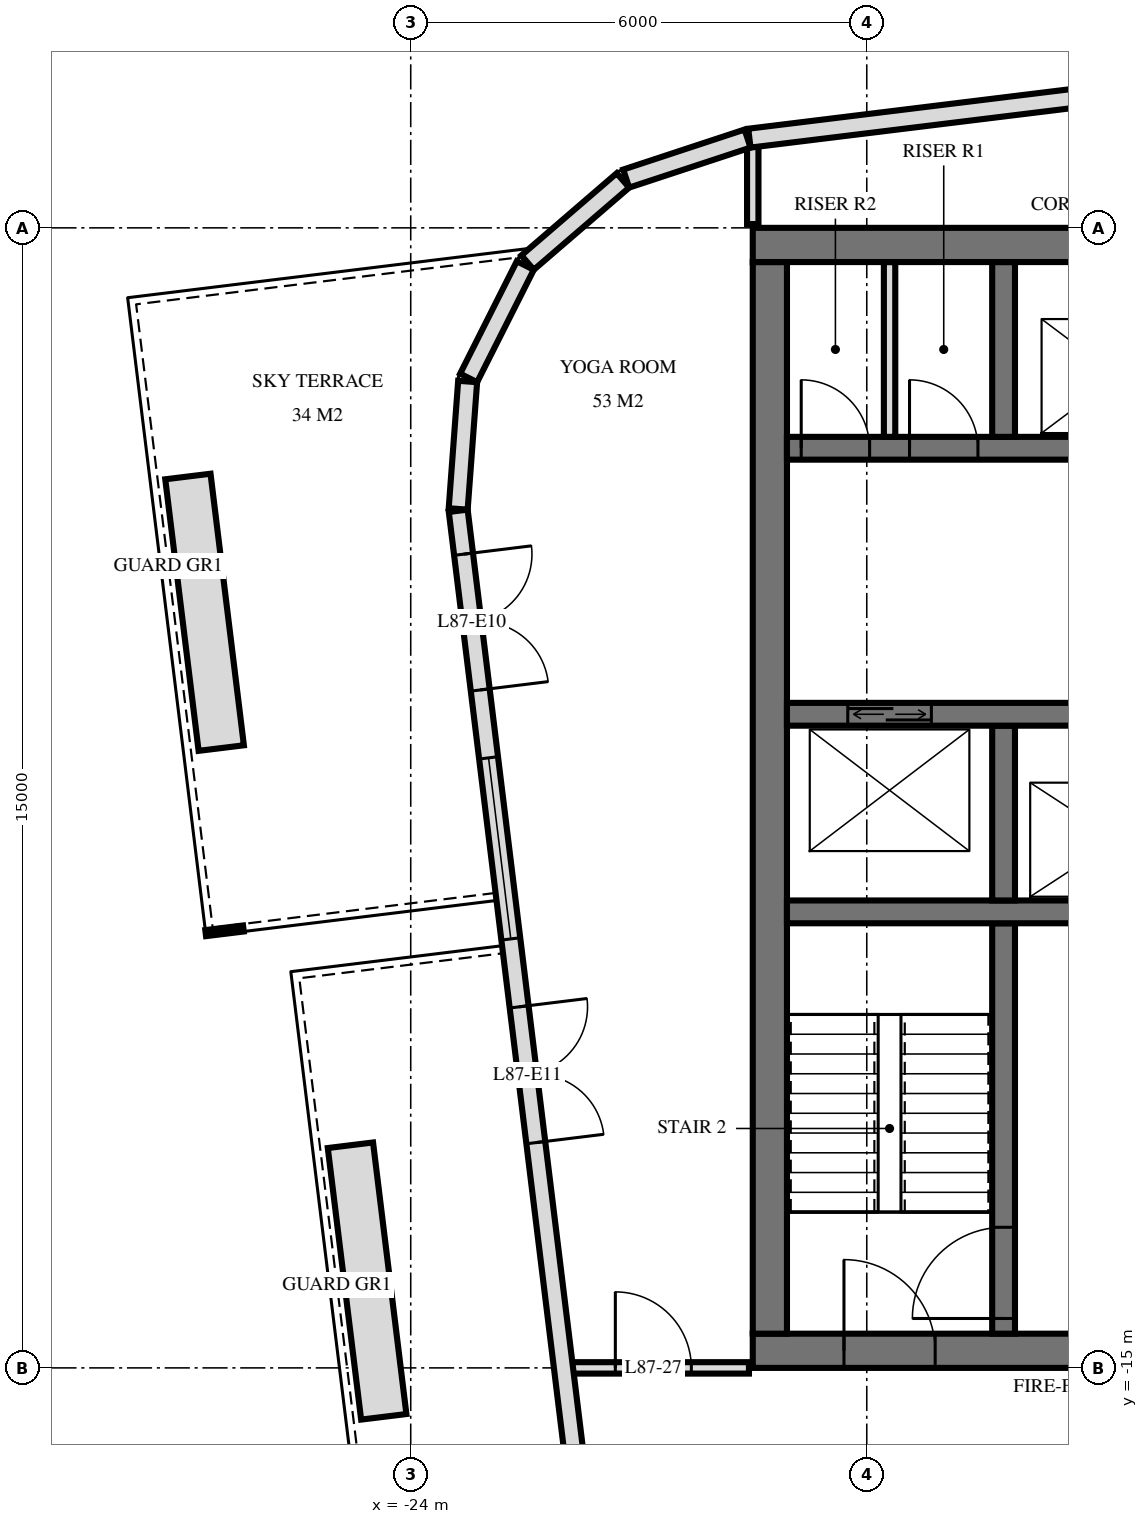
"""IFC4 building model, lengths in metres.
Left out: names, types, materials, properties, quantities, classifications, styles, units other than length and angle.
Written with IfcOpenShell. Run it as: python <this file> out.ifc"""

import sys

from ifc_helpers import new_model, si_unit, direction, frame, frame_2d, origin, place, context, subcontext, project, spatial, rectangle, extrude, element, fill, save


model = new_model("IFC4")
c1 = context("Model", 3, precision=1e-05, world=origin(), true_north=direction((0.0, 1.0)))
c2 = subcontext(c1, "Body", "Model", "MODEL_VIEW")
j1 = project(units=[si_unit("LENGTHUNIT", "METRE"), si_unit("PLANEANGLEUNIT", "RADIAN")], contexts=[c1])
p1 = place(None, origin())
s1 = spatial("IfcSite", under=j1, at=p1, CompositionType="ELEMENT")
p2 = place(p1, origin())
s2 = spatial("IfcBuilding", under=s1, at=p2, CompositionType="ELEMENT")
p3 = place(p2, frame((0.0, 0.0, 330.6)))
s3 = spatial("IfcBuildingStorey", under=s2, at=p3, CompositionType="ELEMENT", Elevation=330.6)
p4 = place(p3, frame((-19.5, -0.225, 0.0), z_axis=(0.0, 0.0, 1.0), x_axis=(1.0, 0.0, 0.0)))
e1 = element("IfcWall", 1, at=p4, inside=s3, PredefinedType="SHEAR", context=c2, shape_type="SweptSolid", body=[
    extrude(rectangle(XDim=9.5, YDim=0.45, at=frame_2d((4.75, 0.0))), origin(), (0.0, 0.0, 1.0), 4.0),
])
p5 = place(p3, frame((-19.5, -14.775, 0.0), z_axis=(0.0, 0.0, 1.0), x_axis=(1.0, 0.0, 0.0)))
e2 = element("IfcWall", 2, at=p5, inside=s3, PredefinedType="SHEAR", context=c2, shape_type="SweptSolid", body=[
    extrude(rectangle(XDim=9.5, YDim=0.45, at=frame_2d((4.75, 0.0))), origin(), (0.0, 0.0, 1.0), 4.0),
])
p6 = place(p5, frame((1.2, 0.0, 0.0)))
e3 = element("IfcOpeningElement", 3, at=p6, cuts=e2, PredefinedType="OPENING", context=c2, shape_type="SweptSolid", body=[
    extrude(rectangle(XDim=1.2, YDim=2.1, at=frame_2d((0.6, 1.05))), frame((0.0, 0.235, 0.0), z_axis=(0.0, -1.0, 0.0), x_axis=(1.0, 0.0, 0.0)), (0.0, 0.0, 1.0), 0.47),
])
p7 = place(p5, frame((4.25, 0.0, 0.0)))
e4 = element("IfcOpeningElement", 4, at=p7, cuts=e2, PredefinedType="OPENING", context=c2, shape_type="SweptSolid", body=[
    extrude(rectangle(XDim=1.1, YDim=2.1, at=frame_2d((0.55, 1.05))), frame((0.0, 0.235, 0.0), z_axis=(0.0, -1.0, 0.0), x_axis=(1.0, 0.0, 0.0)), (0.0, 0.0, 1.0), 0.47),
])
p8 = place(p3, frame((-19.275, -14.55, 0.0), z_axis=(0.0, 0.0, 1.0), x_axis=(0.0, 1.0, 0.0)))
e5 = element("IfcWall", 5, at=p8, inside=s3, PredefinedType="SHEAR", context=c2, shape_type="SweptSolid", body=[
    extrude(rectangle(XDim=14.1, YDim=0.45, at=frame_2d((7.05, 0.0))), origin(), (0.0, 0.0, 1.0), 4.0),
])
p9 = place(p3, frame((-19.05, -2.9, 0.0), z_axis=(0.0, 0.0, 1.0), x_axis=(1.0, 0.0, 0.0)))
e6 = element("IfcWall", 6, at=p9, inside=s3, PredefinedType="SHEAR", context=c2, shape_type="SweptSolid", body=[
    extrude(rectangle(XDim=8.7, YDim=0.3, at=frame_2d((4.35, 0.0))), origin(), (0.0, 0.0, 1.0), 4.0),
])
p10 = place(p9, frame((6.8, 0.0, 0.0)))
e7 = element("IfcOpeningElement", 7, at=p10, cuts=e6, PredefinedType="OPENING", context=c2, shape_type="SweptSolid", body=[
    extrude(rectangle(XDim=1.1, YDim=2.1, at=frame_2d((0.55, 1.05))), frame((0.0, 0.16, 0.0), z_axis=(0.0, -1.0, 0.0), x_axis=(1.0, 0.0, 0.0)), (0.0, 0.0, 1.0), 0.32),
])
p11 = place(p9, frame((3.8, 0.0, 0.0)))
e8 = element("IfcOpeningElement", 8, at=p11, cuts=e6, PredefinedType="OPENING", context=c2, shape_type="SweptSolid", body=[
    extrude(rectangle(XDim=1.1, YDim=2.1, at=frame_2d((0.55, 1.05))), frame((0.0, 0.16, 0.0), z_axis=(0.0, -1.0, 0.0), x_axis=(1.0, 0.0, 0.0)), (0.0, 0.0, 1.0), 0.32),
])
p12 = place(p9, frame((1.613, 0.0, 0.0)))
e9 = element("IfcOpeningElement", 9, at=p12, cuts=e6, PredefinedType="OPENING", context=c2, shape_type="SweptSolid", body=[
    extrude(rectangle(XDim=0.9, YDim=2.1, at=frame_2d((0.45, 1.05))), frame((0.0, 0.16, 0.0), z_axis=(0.0, -1.0, 0.0), x_axis=(1.0, 0.0, 0.0)), (0.0, 0.0, 1.0), 0.32),
])
p13 = place(p9, frame((0.188, 0.0, 0.0)))
e10 = element("IfcOpeningElement", 10, at=p13, cuts=e6, PredefinedType="OPENING", context=c2, shape_type="SweptSolid", body=[
    extrude(rectangle(XDim=0.9, YDim=2.1, at=frame_2d((0.45, 1.05))), frame((0.0, 0.16, 0.0), z_axis=(0.0, -1.0, 0.0), x_axis=(1.0, 0.0, 0.0)), (0.0, 0.0, 1.0), 0.32),
])
p14 = place(p3, frame((-19.05, -6.4, 0.0), z_axis=(0.0, 0.0, 1.0), x_axis=(1.0, 0.0, 0.0)))
e11 = element("IfcWall", 11, at=p14, inside=s3, PredefinedType="SHEAR", context=c2, shape_type="SweptSolid", body=[
    extrude(rectangle(XDim=8.7, YDim=0.3, at=frame_2d((4.35, 0.0))), origin(), (0.0, 0.0, 1.0), 4.0),
])
p15 = place(p14, frame((0.8, 0.0, 0.0)))
e12 = element("IfcOpeningElement", 12, at=p15, cuts=e11, PredefinedType="OPENING", context=c2, shape_type="SweptSolid", body=[
    extrude(rectangle(XDim=1.1, YDim=2.1, at=frame_2d((0.55, 1.05))), frame((0.0, 0.16, 0.0), z_axis=(0.0, -1.0, 0.0), x_axis=(1.0, 0.0, 0.0)), (0.0, 0.0, 1.0), 0.32),
])
p16 = place(p3, frame((-19.05, -9.0, 0.0), z_axis=(0.0, 0.0, 1.0), x_axis=(1.0, 0.0, 0.0)))
e13 = element("IfcWall", 13, at=p16, inside=s3, PredefinedType="SHEAR", context=c2, shape_type="SweptSolid", body=[
    extrude(rectangle(XDim=8.7, YDim=0.3, at=frame_2d((4.35, 0.0))), origin(), (0.0, 0.0, 1.0), 4.0),
])
p17 = place(p16, frame((3.8, 0.0, 0.0)))
e14 = element("IfcOpeningElement", 14, at=p17, cuts=e13, PredefinedType="OPENING", context=c2, shape_type="SweptSolid", body=[
    extrude(rectangle(XDim=1.1, YDim=2.1, at=frame_2d((0.55, 1.05))), frame((0.0, 0.16, 0.0), z_axis=(0.0, -1.0, 0.0), x_axis=(1.0, 0.0, 0.0)), (0.0, 0.0, 1.0), 0.32),
])
for number, where, z_axis, x_axis in (
    (15, (-16.2, -2.75, 0.0), (0.0, 0.0, 1.0), (0.0, 1.0, 0.0)),
    (16, (-16.2, -8.85, 0.0), (0.0, 0.0, 1.0), (0.0, 1.0, 0.0)),
):
    element("IfcWall", number, at=place(p3, frame(where, z_axis=z_axis, x_axis=x_axis)), inside=s3, PredefinedType="SHEAR", context=c2, shape_type="SweptSolid", body=[
        extrude(rectangle(XDim=2.3, YDim=0.3, at=frame_2d((1.15, 0.0))), origin(), (0.0, 0.0, 1.0), 4.0),
    ])
p18 = place(p3, frame((-16.2, -14.55, 0.0), z_axis=(0.0, 0.0, 1.0), x_axis=(0.0, 1.0, 0.0)))
e17 = element("IfcWall", 17, at=p18, inside=s3, PredefinedType="SHEAR", context=c2, shape_type="SweptSolid", body=[
    extrude(rectangle(XDim=5.4, YDim=0.3, at=frame_2d((2.7, 0.0))), origin(), (0.0, 0.0, 1.0), 4.0),
])
p19 = place(p18, frame((0.2, 0.0, 0.0)))
e18 = element("IfcOpeningElement", 18, at=p19, cuts=e17, PredefinedType="OPENING", context=c2, shape_type="SweptSolid", body=[
    extrude(rectangle(XDim=1.2, YDim=2.1, at=frame_2d((0.6, 1.05))), frame((0.0, 0.16, 0.0), z_axis=(0.0, -1.0, 0.0), x_axis=(1.0, 0.0, 0.0)), (0.0, 0.0, 1.0), 0.32),
])
p20 = place(p3, frame((16.138, 5.561, 0.0), z_axis=(0.0, 0.0, 1.0), x_axis=(-0.992546726876, -0.121864658405, 0.0)))
e19 = element("IfcWall", 19, at=p20, inside=s3, PredefinedType="SOLIDWALL", context=c2, shape_type="SweptSolid", body=[
    extrude(rectangle(XDim=35.951, YDim=0.25, at=frame_2d((17.975, 0.0))), origin(), (0.0, 0.0, 1.0), 3.72),
])
p21 = place(p20, frame((12.275, 0.0, 0.0)))
e20 = element("IfcOpeningElement", 20, at=p21, cuts=e19, PredefinedType="OPENING", context=c2, shape_type="SweptSolid", body=[
    extrude(rectangle(XDim=2.4, YDim=2.4, at=frame_2d((1.2, 1.2))), frame((0.0, 0.135, 0.0), z_axis=(0.0, -1.0, 0.0), x_axis=(1.0, 0.0, 0.0)), (0.0, 0.0, 1.0), 0.27),
])
p22 = place(p20, frame((17.865, 0.0, 0.0)))
e21 = element("IfcOpeningElement", 21, at=p22, cuts=e19, PredefinedType="OPENING", context=c2, shape_type="SweptSolid", body=[
    extrude(rectangle(XDim=2.4, YDim=2.4, at=frame_2d((1.2, 1.2))), frame((0.0, 0.135, 0.0), z_axis=(0.0, -1.0, 0.0), x_axis=(1.0, 0.0, 0.0)), (0.0, 0.0, 1.0), 0.27),
])
p23 = place(p20, frame((21.275, 0.0, 0.0)))
e22 = element("IfcOpeningElement", 22, at=p23, cuts=e19, PredefinedType="OPENING", context=c2, shape_type="SweptSolid", body=[
    extrude(rectangle(XDim=2.4, YDim=2.4, at=frame_2d((1.2, 1.2))), frame((0.0, 0.135, 0.0), z_axis=(0.0, -1.0, 0.0), x_axis=(1.0, 0.0, 0.0)), (0.0, 0.0, 1.0), 0.27),
])
p24 = place(p3, frame((-19.568, 1.175, 0.0), z_axis=(0.0, 0.0, 1.0), x_axis=(-0.949694735798, -0.313177120489, 0.0)))
e23 = element("IfcWall", 23, at=p24, inside=s3, PredefinedType="SOLIDWALL", context=c2, shape_type="SweptSolid", body=[
    extrude(rectangle(XDim=1.681, YDim=0.25, at=frame_2d((0.841, 0.0))), origin(), (0.0, 0.0, 1.0), 3.72),
])
p25 = place(p3, frame((-21.208, 0.624, 0.0), z_axis=(0.0, 0.0, 1.0), x_axis=(-0.757568315466, -0.652755886531, 0.0)))
e24 = element("IfcWall", 24, at=p25, inside=s3, PredefinedType="SOLIDWALL", context=c2, shape_type="SweptSolid", body=[
    extrude(rectangle(XDim=1.656, YDim=0.25, at=frame_2d((0.828, 0.0))), origin(), (0.0, 0.0, 1.0), 3.72),
])
p26 = place(p3, frame((-22.493, -0.495, 0.0), z_axis=(0.0, 0.0, 1.0), x_axis=(-0.449982385812, -0.893037430604, 0.0)))
e25 = element("IfcWall", 25, at=p26, inside=s3, PredefinedType="SOLIDWALL", context=c2, shape_type="SweptSolid", body=[
    extrude(rectangle(XDim=1.656, YDim=0.25, at=frame_2d((0.828, 0.0))), origin(), (0.0, 0.0, 1.0), 3.72),
])
p27 = place(p3, frame((-23.251, -2.021, 0.0), z_axis=(0.0, 0.0, 1.0), x_axis=(-0.074053534713, -0.997254267475, 0.0)))
e26 = element("IfcWall", 26, at=p27, inside=s3, PredefinedType="SOLIDWALL", context=c2, shape_type="SweptSolid", body=[
    extrude(rectangle(XDim=1.681, YDim=0.25, at=frame_2d((0.841, 0.0))), origin(), (0.0, 0.0, 1.0), 3.72),
])
p28 = place(p3, frame((-23.375, -3.723, 0.0), z_axis=(0.0, 0.0, 1.0), x_axis=(0.121862878281, -0.992546945437, 0.0)))
e27 = element("IfcWall", 27, at=p28, inside=s3, PredefinedType="SOLIDWALL", context=c2, shape_type="SweptSolid", body=[
    extrude(rectangle(XDim=19.151, YDim=0.25, at=frame_2d((9.575, 0.0))), origin(), (0.0, 0.0, 1.0), 3.72),
])
p29 = place(p28, frame((0.575, 0.0, 0.0)))
e28 = element("IfcOpeningElement", 28, at=p29, cuts=e27, PredefinedType="OPENING", context=c2, shape_type="SweptSolid", body=[
    extrude(rectangle(XDim=1.8, YDim=2.4, at=frame_2d((0.9, 1.2))), frame((0.0, 0.135, 0.0), z_axis=(0.0, -1.0, 0.0), x_axis=(1.0, 0.0, 0.0)), (0.0, 0.0, 1.0), 0.27),
])
p30 = place(p28, frame((3.275, 0.0, 0.0)))
e29 = element("IfcOpeningElement", 29, at=p30, cuts=e27, PredefinedType="OPENING", context=c2, shape_type="SweptSolid", body=[
    extrude(rectangle(XDim=2.4, YDim=2.4, at=frame_2d((1.2, 1.2))), frame((0.0, 0.135, 0.0), z_axis=(0.0, -1.0, 0.0), x_axis=(1.0, 0.0, 0.0)), (0.0, 0.0, 1.0), 0.27),
])
p31 = place(p28, frame((6.576, 0.0, 0.0)))
e30 = element("IfcOpeningElement", 30, at=p31, cuts=e27, PredefinedType="OPENING", context=c2, shape_type="SweptSolid", body=[
    extrude(rectangle(XDim=1.8, YDim=2.4, at=frame_2d((0.9, 1.2))), frame((0.0, 0.135, 0.0), z_axis=(0.0, -1.0, 0.0), x_axis=(1.0, 0.0, 0.0)), (0.0, 0.0, 1.0), 0.27),
])
p32 = place(p28, frame((15.775, 0.0, 0.0)))
e31 = element("IfcOpeningElement", 31, at=p32, cuts=e27, PredefinedType="OPENING", context=c2, shape_type="SweptSolid", body=[
    extrude(rectangle(XDim=1.8, YDim=2.4, at=frame_2d((0.9, 1.2))), frame((0.0, 0.135, 0.0), z_axis=(0.0, -1.0, 0.0), x_axis=(1.0, 0.0, 0.0)), (0.0, 0.0, 1.0), 0.27),
])
for number, where, z_axis, x_axis in (
    (32, (-24.355, -15.644, 0.0), (0.0, 0.0, 1.0), (-0.122, 0.993, 0.0)),
    (33, (-26.493, -6.845, 0.0), (0.0, 0.0, 1.0), (-0.122, 0.993, 0.0)),
):
    element("IfcWall", number, at=place(p3, frame(where, z_axis=z_axis, x_axis=x_axis)), inside=s3, PredefinedType="USERDEFINED", context=c2, shape_type="SweptSolid", body=[
        extrude(rectangle(XDim=3.6, YDim=0.6, at=frame_2d((1.8, 0.0))), origin(), (0.0, 0.0, 1.0), 0.65),
    ])
p33 = place(p3, frame((-17.7, -2.75, 0.0), z_axis=(0.0, 0.0, 1.0), x_axis=(0.0, 1.0, 0.0)))
e34 = element("IfcWall", 34, at=p33, inside=s3, PredefinedType="PARTITIONING", context=c2, shape_type="SweptSolid", body=[
    extrude(rectangle(XDim=2.3, YDim=0.15, at=frame_2d((1.15, 0.0))), origin(), (0.0, 0.0, 1.0), 3.7),
])
p34 = place(p3, frame((-19.5, 0.05, 0.0), z_axis=(0.0, 0.0, 1.0), x_axis=(0.0, 1.0, 0.0)))
e35 = element("IfcWall", 35, at=p34, inside=s3, PredefinedType="PARTITIONING", context=c2, shape_type="SweptSolid", body=[
    extrude(rectangle(XDim=1.08, YDim=0.15, at=frame_2d((0.54, 0.0))), origin(), (0.0, 0.0, 1.0), 3.72),
])
p35 = place(p3, frame((-21.935, -15.0, 0.0), z_axis=(0.0, 0.0, 1.0), x_axis=(1.0, 0.0, 0.0)))
e36 = element("IfcWall", 36, at=p35, inside=s3, PredefinedType="PARTITIONING", context=c2, shape_type="SweptSolid", body=[
    extrude(rectangle(XDim=2.385, YDim=0.15, at=frame_2d((1.192, 0.0))), origin(), (0.0, 0.0, 1.0), 3.72),
])
p36 = place(p35, frame((0.627, 0.0, 0.0)))
e37 = element("IfcOpeningElement", 37, at=p36, cuts=e36, PredefinedType="OPENING", context=c2, shape_type="SweptSolid", body=[
    extrude(rectangle(XDim=1.0, YDim=2.1, at=frame_2d((0.5, 1.05))), frame((0.0, 0.085, 0.0), z_axis=(0.0, -1.0, 0.0), x_axis=(1.0, 0.0, 0.0)), (0.0, 0.0, 1.0), 0.17),
])
p37 = place(p29, origin())
e38 = element("IfcDoor", 38, at=p37, inside=s3, OperationType="DOUBLE_DOOR_SINGLE_SWING", PredefinedType="DOOR", context=c2, shape_type="SweptSolid", body=[
    extrude(rectangle(XDim=1.8, YDim=2.4, at=frame_2d((0.9, 1.2))), frame((0.0, 0.025, 0.0), z_axis=(0.0, -1.0, 0.0), x_axis=(1.0, 0.0, 0.0)), (0.0, 0.0, 1.0), 0.05),
])
fill(e28, e38)
p38 = place(p30, origin())
e39 = element("IfcWindow", 39, at=p38, inside=s3, PartitioningType="SINGLE_PANEL", PredefinedType="WINDOW", context=c2, shape_type="SweptSolid", body=[
    extrude(rectangle(XDim=2.4, YDim=2.4, at=frame_2d((1.2, 1.2))), frame((0.0, 0.03, 0.0), z_axis=(0.0, -1.0, 0.0), x_axis=(1.0, 0.0, 0.0)), (0.0, 0.0, 1.0), 0.06),
])
fill(e29, e39)
p39 = place(p31, origin())
e40 = element("IfcDoor", 40, at=p39, inside=s3, OperationType="DOUBLE_DOOR_SINGLE_SWING", PredefinedType="DOOR", context=c2, shape_type="SweptSolid", body=[
    extrude(rectangle(XDim=1.8, YDim=2.4, at=frame_2d((0.9, 1.2))), frame((0.0, 0.025, 0.0), z_axis=(0.0, -1.0, 0.0), x_axis=(1.0, 0.0, 0.0)), (0.0, 0.0, 1.0), 0.05),
])
fill(e30, e40)
p40 = place(p15, origin())
e41 = element("IfcDoor", 41, at=p40, inside=s3, OperationType="DOUBLE_DOOR_SLIDING", PredefinedType="USERDEFINED", context=c2, shape_type="SweptSolid", body=[
    extrude(rectangle(XDim=1.1, YDim=2.1, at=frame_2d((0.55, 1.05))), frame((0.0, 0.025, 0.0), z_axis=(0.0, -1.0, 0.0), x_axis=(1.0, 0.0, 0.0)), (0.0, 0.0, 1.0), 0.05),
])
fill(e12, e41)
p41 = place(p6, origin())
e42 = element("IfcDoor", 42, at=p41, inside=s3, OperationType="SINGLE_SWING_RIGHT", PredefinedType="DOOR", context=c2, shape_type="SweptSolid", body=[
    extrude(rectangle(XDim=1.2, YDim=2.1, at=frame_2d((0.6, 1.05))), frame((0.0, 0.025, 0.0), z_axis=(0.0, -1.0, 0.0), x_axis=(1.0, 0.0, 0.0)), (0.0, 0.0, 1.0), 0.05),
])
fill(e3, e42)
p42 = place(p12, origin())
e43 = element("IfcDoor", 43, at=p42, inside=s3, OperationType="SINGLE_SWING_RIGHT", PredefinedType="DOOR", context=c2, shape_type="SweptSolid", body=[
    extrude(rectangle(XDim=0.9, YDim=2.1, at=frame_2d((0.45, 1.05))), frame((0.0, 0.025, 0.0), z_axis=(0.0, -1.0, 0.0), x_axis=(1.0, 0.0, 0.0)), (0.0, 0.0, 1.0), 0.05),
])
fill(e9, e43)
p43 = place(p13, origin())
e44 = element("IfcDoor", 44, at=p43, inside=s3, OperationType="SINGLE_SWING_RIGHT", PredefinedType="DOOR", context=c2, shape_type="SweptSolid", body=[
    extrude(rectangle(XDim=0.9, YDim=2.1, at=frame_2d((0.45, 1.05))), frame((0.0, 0.025, 0.0), z_axis=(0.0, -1.0, 0.0), x_axis=(1.0, 0.0, 0.0)), (0.0, 0.0, 1.0), 0.05),
])
fill(e10, e44)
p44 = place(p19, origin())
e45 = element("IfcDoor", 45, at=p44, inside=s3, OperationType="SINGLE_SWING_RIGHT", PredefinedType="DOOR", context=c2, shape_type="SweptSolid", body=[
    extrude(rectangle(XDim=1.2, YDim=2.1, at=frame_2d((0.6, 1.05))), frame((0.0, 0.025, 0.0), z_axis=(0.0, -1.0, 0.0), x_axis=(1.0, 0.0, 0.0)), (0.0, 0.0, 1.0), 0.05),
])
fill(e18, e45)
p45 = place(p36, origin())
e46 = element("IfcDoor", 46, at=p45, inside=s3, OperationType="SINGLE_SWING_RIGHT", PredefinedType="DOOR", context=c2, shape_type="SweptSolid", body=[
    extrude(rectangle(XDim=1.0, YDim=2.1, at=frame_2d((0.5, 1.05))), frame((0.0, 0.025, 0.0), z_axis=(0.0, -1.0, 0.0), x_axis=(1.0, 0.0, 0.0)), (0.0, 0.0, 1.0), 0.05),
])
fill(e37, e46)
save(model, sys.argv[1])
